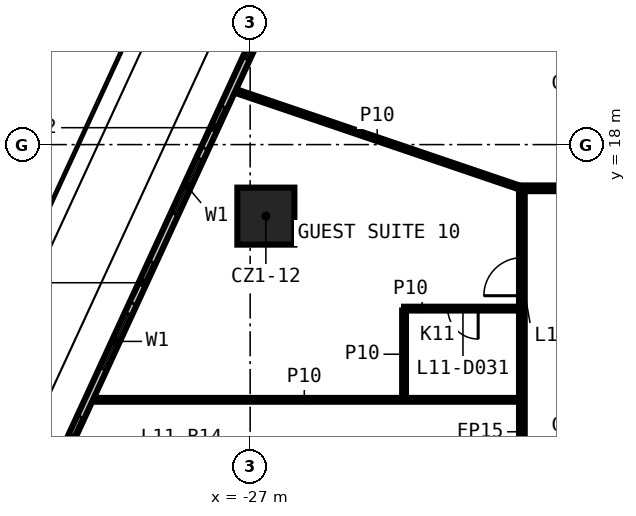
"""IFC4 building model, lengths in metres.
Left out: names, types, materials, properties, quantities, classifications, styles, units other than length and angle.
Written with IfcOpenShell. Run it as: python <this file> out.ifc"""

import sys

from ifc_helpers import new_model, si_unit, direction, frame, frame_2d, origin, origin_2d, place, context, subcontext, project, spatial, rectangle, extrude, element, fill, save


model = new_model("IFC4")
c1 = context("Model", 3, precision=1e-05, world=origin(), true_north=direction((0.0, 1.0)))
c2 = subcontext(c1, "Body", "Model", "MODEL_VIEW")
j1 = project(units=[si_unit("LENGTHUNIT", "METRE"), si_unit("PLANEANGLEUNIT", "RADIAN")], contexts=[c1])
p1 = place(None, origin())
s1 = spatial("IfcSite", under=j1, at=p1, CompositionType="ELEMENT")
p2 = place(p1, origin())
s2 = spatial("IfcBuilding", under=s1, at=p2, CompositionType="ELEMENT")
p3 = place(p2, frame((0.0, 0.0, 62.5)))
s3 = spatial("IfcBuildingStorey", under=s2, at=p3, CompositionType="ELEMENT", Elevation=62.5)
p4 = place(p3, frame((-26.586, 16.118, 0.0), z_axis=(0.0, 0.0, 1.0), x_axis=(1.0, 0.0, 0.0)))
e1 = element("IfcColumn", 1, at=p4, inside=s3, PredefinedType="COLUMN", context=c2, shape_type="SweptSolid", body=[
    extrude(rectangle(XDim=1.5, YDim=1.5, at=origin_2d()), origin(), (0.0, 0.0, 1.0), 3.3),
])
p5 = place(p3, frame((-31.225, 11.284, 0.0), z_axis=(0.0, 0.0, 1.0), x_axis=(1.0, 0.0, 0.0)))
e2 = element("IfcWall", 2, at=p5, inside=s3, PredefinedType="PARTITIONING", context=c2, shape_type="SweptSolid", body=[
    extrude(rectangle(XDim=11.3, YDim=0.1, at=frame_2d((5.65, 0.0))), origin(), (0.0, 0.0, 1.0), 3.3),
])
p6 = place(p3, frame((-19.925, 13.684, 0.0), z_axis=(0.0, 0.0, 1.0), x_axis=(-1.0, 0.0, 0.0)))
e3 = element("IfcWall", 3, at=p6, inside=s3, PredefinedType="PARTITIONING", context=c2, shape_type="SweptSolid", body=[
    extrude(rectangle(XDim=3.025, YDim=0.1, at=frame_2d((1.512, 0.0))), origin(), (0.0, 0.0, 1.0), 3.3),
])
p7 = place(p6, frame((1.075, 0.0, 0.0)))
e4 = element("IfcOpeningElement", 4, at=p7, cuts=e3, PredefinedType="OPENING", context=c2, shape_type="SweptSolid", body=[
    extrude(rectangle(XDim=0.8, YDim=2.1, at=frame_2d((0.4, 1.05))), frame((0.0, 0.06, 0.0), z_axis=(0.0, -1.0, 0.0), x_axis=(1.0, 0.0, 0.0)), (0.0, 0.0, 1.0), 0.12),
])
p8 = place(p3, frame((-19.925, 16.85, 0.0), z_axis=(0.0, 0.0, 1.0), x_axis=(1.0, 0.0, 0.0)))
e5 = element("IfcWall", 5, at=p8, inside=s3, PredefinedType="PARTITIONING", context=c2, shape_type="SweptSolid", body=[
    extrude(rectangle(XDim=39.85, YDim=0.15, at=frame_2d((19.925, 0.0))), origin(), (0.0, 0.0, 1.0), 3.3),
])
p9 = place(p8, frame((31.433, 0.0, 0.0)))
e6 = element("IfcOpeningElement", 6, at=p9, cuts=e5, PredefinedType="OPENING", context=c2, shape_type="SweptSolid", body=[
    extrude(rectangle(XDim=0.9, YDim=2.1, at=frame_2d((0.45, 1.05))), frame((0.0, 0.085, 0.0), z_axis=(0.0, -1.0, 0.0), x_axis=(1.0, 0.0, 0.0)), (0.0, 0.0, 1.0), 0.17),
])
p10 = place(p8, frame((22.043, 0.0, 0.0)))
e7 = element("IfcOpeningElement", 7, at=p10, cuts=e5, PredefinedType="OPENING", context=c2, shape_type="SweptSolid", body=[
    extrude(rectangle(XDim=0.9, YDim=2.1, at=frame_2d((0.45, 1.05))), frame((0.0, 0.085, 0.0), z_axis=(0.0, -1.0, 0.0), x_axis=(1.0, 0.0, 0.0)), (0.0, 0.0, 1.0), 0.17),
])
p11 = place(p8, frame((16.957, 0.0, 0.0)))
e8 = element("IfcOpeningElement", 8, at=p11, cuts=e5, PredefinedType="OPENING", context=c2, shape_type="SweptSolid", body=[
    extrude(rectangle(XDim=0.9, YDim=2.1, at=frame_2d((0.45, 1.05))), frame((0.0, 0.085, 0.0), z_axis=(0.0, -1.0, 0.0), x_axis=(1.0, 0.0, 0.0)), (0.0, 0.0, 1.0), 0.17),
])
p12 = place(p8, frame((13.572, 0.0, 0.0)))
e9 = element("IfcOpeningElement", 9, at=p12, cuts=e5, PredefinedType="OPENING", context=c2, shape_type="SweptSolid", body=[
    extrude(rectangle(XDim=0.9, YDim=2.1, at=frame_2d((0.45, 1.05))), frame((0.0, 0.085, 0.0), z_axis=(0.0, -1.0, 0.0), x_axis=(1.0, 0.0, 0.0)), (0.0, 0.0, 1.0), 0.17),
])
p13 = place(p8, frame((7.458, 0.0, 0.0)))
e10 = element("IfcOpeningElement", 10, at=p13, cuts=e5, PredefinedType="OPENING", context=c2, shape_type="SweptSolid", body=[
    extrude(rectangle(XDim=1.0, YDim=2.1, at=frame_2d((0.5, 1.05))), frame((0.0, 0.085, 0.0), z_axis=(0.0, -1.0, 0.0), x_axis=(1.0, 0.0, 0.0)), (0.0, 0.0, 1.0), 0.17),
])
p14 = place(p3, frame((-19.85, -16.775, 0.0), z_axis=(0.0, 0.0, 1.0), x_axis=(0.0, 1.0, 0.0)))
e11 = element("IfcWall", 11, at=p14, inside=s3, PredefinedType="PARTITIONING", context=c2, shape_type="SweptSolid", body=[
    extrude(rectangle(XDim=33.55, YDim=0.15, at=frame_2d((16.775, 0.0))), origin(), (0.0, 0.0, 1.0), 3.3),
])
p15 = place(p14, frame((12.083, 0.0, 0.0)))
e12 = element("IfcOpeningElement", 12, at=p15, cuts=e11, PredefinedType="OPENING", context=c2, shape_type="SweptSolid", body=[
    extrude(rectangle(XDim=1.0, YDim=2.1, at=frame_2d((0.5, 1.05))), frame((0.0, 0.085, 0.0), z_axis=(0.0, -1.0, 0.0), x_axis=(1.0, 0.0, 0.0)), (0.0, 0.0, 1.0), 0.17),
])
p16 = place(p14, frame((10.128, 0.0, 0.0)))
e13 = element("IfcOpeningElement", 13, at=p16, cuts=e11, PredefinedType="OPENING", context=c2, shape_type="SweptSolid", body=[
    extrude(rectangle(XDim=1.0, YDim=2.1, at=frame_2d((0.5, 1.05))), frame((0.0, 0.085, 0.0), z_axis=(0.0, -1.0, 0.0), x_axis=(1.0, 0.0, 0.0)), (0.0, 0.0, 1.0), 0.17),
])
p17 = place(p14, frame((3.259, 0.0, 0.0)))
e14 = element("IfcOpeningElement", 14, at=p17, cuts=e11, PredefinedType="OPENING", context=c2, shape_type="SweptSolid", body=[
    extrude(rectangle(XDim=0.9, YDim=2.1, at=frame_2d((0.45, 1.05))), frame((0.0, 0.085, 0.0), z_axis=(0.0, -1.0, 0.0), x_axis=(1.0, 0.0, 0.0)), (0.0, 0.0, 1.0), 0.17),
])
p18 = place(p14, frame((30.799, 0.0, 0.0)))
e15 = element("IfcOpeningElement", 15, at=p18, cuts=e11, PredefinedType="OPENING", context=c2, shape_type="SweptSolid", body=[
    extrude(rectangle(XDim=1.0, YDim=2.1, at=frame_2d((0.5, 1.05))), frame((0.0, 0.085, 0.0), z_axis=(0.0, -1.0, 0.0), x_axis=(1.0, 0.0, 0.0)), (0.0, 0.0, 1.0), 0.17),
])
p19 = place(p14, frame((22.638, 0.0, 0.0)))
e16 = element("IfcOpeningElement", 16, at=p19, cuts=e11, PredefinedType="OPENING", context=c2, shape_type="SweptSolid", body=[
    extrude(rectangle(XDim=1.0, YDim=2.1, at=frame_2d((0.5, 1.05))), frame((0.0, 0.085, 0.0), z_axis=(0.0, -1.0, 0.0), x_axis=(1.0, 0.0, 0.0)), (0.0, 0.0, 1.0), 0.17),
])
p20 = place(p14, frame((18.681, 0.0, 0.0)))
e17 = element("IfcOpeningElement", 17, at=p20, cuts=e11, PredefinedType="OPENING", context=c2, shape_type="SweptSolid", body=[
    extrude(rectangle(XDim=0.9, YDim=2.1, at=frame_2d((0.45, 1.05))), frame((0.0, 0.085, 0.0), z_axis=(0.0, -1.0, 0.0), x_axis=(1.0, 0.0, 0.0)), (0.0, 0.0, 1.0), 0.17),
])
p21 = place(p3, frame((-22.95, 11.334, 0.0), z_axis=(0.0, 0.0, 1.0), x_axis=(0.0, 1.0, 0.0)))
e18 = element("IfcWall", 18, at=p21, inside=s3, PredefinedType="PARTITIONING", context=c2, shape_type="SweptSolid", body=[
    extrude(rectangle(XDim=2.3, YDim=0.1, at=frame_2d((1.15, 0.0))), origin(), (0.0, 0.0, 1.0), 3.3),
])
p22 = place(p3, frame((-27.464, 19.438, 0.0), z_axis=(0.0, 0.0, 1.0), x_axis=(0.946811969778, -0.321787342643, 0.0)))
e19 = element("IfcWall", 19, at=p22, inside=s3, PredefinedType="PARTITIONING", context=c2, shape_type="SweptSolid", body=[
    extrude(rectangle(XDim=8.042, YDim=0.1, at=frame_2d((4.021, 0.0))), origin(), (0.0, 0.0, 1.0), 3.3),
])
p23 = place(p3, frame((-25.601, 23.524, 0.0), z_axis=(0.0, 0.0, 1.0), x_axis=(-0.418809499218, -0.908074117771, 0.0)))
e20 = element("IfcWall", 20, at=p23, inside=s3, PredefinedType="SOLIDWALL", context=c2, shape_type="SweptSolid", body=[
    extrude(rectangle(XDim=26.959, YDim=0.2, at=frame_2d((13.479, 0.0))), origin(), (0.0, 0.0, 1.0), 3.3),
])
p24 = place(p23, frame((2.0, 0.0, 0.6)))
e21 = element("IfcOpeningElement", 21, at=p24, cuts=e20, PredefinedType="OPENING", context=c2, shape_type="SweptSolid", body=[
    extrude(rectangle(XDim=1.6, YDim=2.4, at=frame_2d((0.8, 1.2))), frame((0.0, 0.11, 0.0), z_axis=(0.0, -1.0, 0.0), x_axis=(1.0, 0.0, 0.0)), (0.0, 0.0, 1.0), 0.22),
])
p25 = place(p23, frame((0.5, 0.0, 0.0)))
e22 = element("IfcOpeningElement", 22, at=p25, cuts=e20, PredefinedType="OPENING", context=c2, shape_type="SweptSolid", body=[
    extrude(rectangle(XDim=1.2, YDim=2.4, at=frame_2d((0.6, 1.2))), frame((0.0, 0.11, 0.0), z_axis=(0.0, -1.0, 0.0), x_axis=(1.0, 0.0, 0.0)), (0.0, 0.0, 1.0), 0.22),
])
p26 = place(p23, frame((6.493, 0.0, 0.6)))
e23 = element("IfcOpeningElement", 23, at=p26, cuts=e20, PredefinedType="OPENING", context=c2, shape_type="SweptSolid", body=[
    extrude(rectangle(XDim=1.6, YDim=2.4, at=frame_2d((0.8, 1.2))), frame((0.0, 0.11, 0.0), z_axis=(0.0, -1.0, 0.0), x_axis=(1.0, 0.0, 0.0)), (0.0, 0.0, 1.0), 0.22),
])
p27 = place(p23, frame((4.993, 0.0, 0.0)))
e24 = element("IfcOpeningElement", 24, at=p27, cuts=e20, PredefinedType="OPENING", context=c2, shape_type="SweptSolid", body=[
    extrude(rectangle(XDim=1.2, YDim=2.4, at=frame_2d((0.6, 1.2))), frame((0.0, 0.11, 0.0), z_axis=(0.0, -1.0, 0.0), x_axis=(1.0, 0.0, 0.0)), (0.0, 0.0, 1.0), 0.22),
])
p28 = place(p23, frame((10.987, 0.0, 0.6)))
e25 = element("IfcOpeningElement", 25, at=p28, cuts=e20, PredefinedType="OPENING", context=c2, shape_type="SweptSolid", body=[
    extrude(rectangle(XDim=1.6, YDim=2.4, at=frame_2d((0.8, 1.2))), frame((0.0, 0.11, 0.0), z_axis=(0.0, -1.0, 0.0), x_axis=(1.0, 0.0, 0.0)), (0.0, 0.0, 1.0), 0.22),
])
p29 = place(p23, frame((9.487, 0.0, 0.0)))
e26 = element("IfcOpeningElement", 26, at=p29, cuts=e20, PredefinedType="OPENING", context=c2, shape_type="SweptSolid", body=[
    extrude(rectangle(XDim=1.2, YDim=2.4, at=frame_2d((0.6, 1.2))), frame((0.0, 0.11, 0.0), z_axis=(0.0, -1.0, 0.0), x_axis=(1.0, 0.0, 0.0)), (0.0, 0.0, 1.0), 0.22),
])
p30 = place(p23, frame((15.48, 0.0, 0.6)))
e27 = element("IfcOpeningElement", 27, at=p30, cuts=e20, PredefinedType="OPENING", context=c2, shape_type="SweptSolid", body=[
    extrude(rectangle(XDim=1.6, YDim=2.4, at=frame_2d((0.8, 1.2))), frame((0.0, 0.11, 0.0), z_axis=(0.0, -1.0, 0.0), x_axis=(1.0, 0.0, 0.0)), (0.0, 0.0, 1.0), 0.22),
])
p31 = place(p23, frame((13.98, 0.0, 0.0)))
e28 = element("IfcOpeningElement", 28, at=p31, cuts=e20, PredefinedType="OPENING", context=c2, shape_type="SweptSolid", body=[
    extrude(rectangle(XDim=1.2, YDim=2.4, at=frame_2d((0.6, 1.2))), frame((0.0, 0.11, 0.0), z_axis=(0.0, -1.0, 0.0), x_axis=(1.0, 0.0, 0.0)), (0.0, 0.0, 1.0), 0.22),
])
p32 = place(p23, frame((19.973, 0.0, 0.6)))
e29 = element("IfcOpeningElement", 29, at=p32, cuts=e20, PredefinedType="OPENING", context=c2, shape_type="SweptSolid", body=[
    extrude(rectangle(XDim=1.6, YDim=2.4, at=frame_2d((0.8, 1.2))), frame((0.0, 0.11, 0.0), z_axis=(0.0, -1.0, 0.0), x_axis=(1.0, 0.0, 0.0)), (0.0, 0.0, 1.0), 0.22),
])
p33 = place(p23, frame((18.473, 0.0, 0.0)))
e30 = element("IfcOpeningElement", 30, at=p33, cuts=e20, PredefinedType="OPENING", context=c2, shape_type="SweptSolid", body=[
    extrude(rectangle(XDim=1.2, YDim=2.4, at=frame_2d((0.6, 1.2))), frame((0.0, 0.11, 0.0), z_axis=(0.0, -1.0, 0.0), x_axis=(1.0, 0.0, 0.0)), (0.0, 0.0, 1.0), 0.22),
])
p34 = place(p23, frame((24.466, 0.0, 0.6)))
e31 = element("IfcOpeningElement", 31, at=p34, cuts=e20, PredefinedType="OPENING", context=c2, shape_type="SweptSolid", body=[
    extrude(rectangle(XDim=1.6, YDim=2.4, at=frame_2d((0.8, 1.2))), frame((0.0, 0.11, 0.0), z_axis=(0.0, -1.0, 0.0), x_axis=(1.0, 0.0, 0.0)), (0.0, 0.0, 1.0), 0.22),
])
p35 = place(p23, frame((22.966, 0.0, 0.0)))
e32 = element("IfcOpeningElement", 32, at=p35, cuts=e20, PredefinedType="OPENING", context=c2, shape_type="SweptSolid", body=[
    extrude(rectangle(XDim=1.2, YDim=2.4, at=frame_2d((0.6, 1.2))), frame((0.0, 0.11, 0.0), z_axis=(0.0, -1.0, 0.0), x_axis=(1.0, 0.0, 0.0)), (0.0, 0.0, 1.0), 0.22),
])
p36 = place(p7, origin())
e33 = element("IfcDoor", 33, at=p36, inside=s3, OperationType="SINGLE_SWING_RIGHT", PredefinedType="DOOR", context=c2, shape_type="SweptSolid", body=[
    extrude(rectangle(XDim=0.8, YDim=2.1, at=frame_2d((0.4, 1.05))), frame((0.0, 0.025, 0.0), z_axis=(0.0, -1.0, 0.0), x_axis=(1.0, 0.0, 0.0)), (0.0, 0.0, 1.0), 0.05),
])
fill(e4, e33)
p37 = place(p18, origin())
e34 = element("IfcDoor", 34, at=p37, inside=s3, OperationType="SINGLE_SWING_LEFT", PredefinedType="DOOR", context=c2, shape_type="SweptSolid", body=[
    extrude(rectangle(XDim=1.0, YDim=2.1, at=frame_2d((0.5, 1.05))), frame((0.0, 0.025, 0.0), z_axis=(0.0, -1.0, 0.0), x_axis=(1.0, 0.0, 0.0)), (0.0, 0.0, 1.0), 0.05),
])
fill(e15, e34)
p38 = place(p24, origin())
e35 = element("IfcWindow", 35, at=p38, inside=s3, PartitioningType="SINGLE_PANEL", PredefinedType="WINDOW", context=c2, shape_type="SweptSolid", body=[
    extrude(rectangle(XDim=1.6, YDim=2.4, at=frame_2d((0.8, 1.2))), frame((0.0, 0.03, 0.0), z_axis=(0.0, -1.0, 0.0), x_axis=(1.0, 0.0, 0.0)), (0.0, 0.0, 1.0), 0.06),
])
fill(e21, e35)
p39 = place(p26, origin())
e36 = element("IfcWindow", 36, at=p39, inside=s3, PartitioningType="SINGLE_PANEL", PredefinedType="WINDOW", context=c2, shape_type="SweptSolid", body=[
    extrude(rectangle(XDim=1.6, YDim=2.4, at=frame_2d((0.8, 1.2))), frame((0.0, 0.03, 0.0), z_axis=(0.0, -1.0, 0.0), x_axis=(1.0, 0.0, 0.0)), (0.0, 0.0, 1.0), 0.06),
])
fill(e23, e36)
p40 = place(p27, origin())
e37 = element("IfcDoor", 37, at=p40, inside=s3, OperationType="SLIDING_TO_LEFT", PredefinedType="DOOR", context=c2, shape_type="SweptSolid", body=[
    extrude(rectangle(XDim=1.2, YDim=2.4, at=frame_2d((0.6, 1.2))), frame((0.0, 0.025, 0.0), z_axis=(0.0, -1.0, 0.0), x_axis=(1.0, 0.0, 0.0)), (0.0, 0.0, 1.0), 0.05),
])
fill(e24, e37)
p41 = place(p28, origin())
e38 = element("IfcWindow", 38, at=p41, inside=s3, PartitioningType="SINGLE_PANEL", PredefinedType="WINDOW", context=c2, shape_type="SweptSolid", body=[
    extrude(rectangle(XDim=1.6, YDim=2.4, at=frame_2d((0.8, 1.2))), frame((0.0, 0.03, 0.0), z_axis=(0.0, -1.0, 0.0), x_axis=(1.0, 0.0, 0.0)), (0.0, 0.0, 1.0), 0.06),
])
fill(e25, e38)
p42 = place(p29, origin())
e39 = element("IfcDoor", 39, at=p42, inside=s3, OperationType="SLIDING_TO_LEFT", PredefinedType="DOOR", context=c2, shape_type="SweptSolid", body=[
    extrude(rectangle(XDim=1.2, YDim=2.4, at=frame_2d((0.6, 1.2))), frame((0.0, 0.025, 0.0), z_axis=(0.0, -1.0, 0.0), x_axis=(1.0, 0.0, 0.0)), (0.0, 0.0, 1.0), 0.05),
])
fill(e26, e39)
p43 = place(p31, origin())
e40 = element("IfcDoor", 40, at=p43, inside=s3, OperationType="SLIDING_TO_LEFT", PredefinedType="DOOR", context=c2, shape_type="SweptSolid", body=[
    extrude(rectangle(XDim=1.2, YDim=2.4, at=frame_2d((0.6, 1.2))), frame((0.0, 0.025, 0.0), z_axis=(0.0, -1.0, 0.0), x_axis=(1.0, 0.0, 0.0)), (0.0, 0.0, 1.0), 0.05),
])
fill(e28, e40)
save(model, sys.argv[1])
